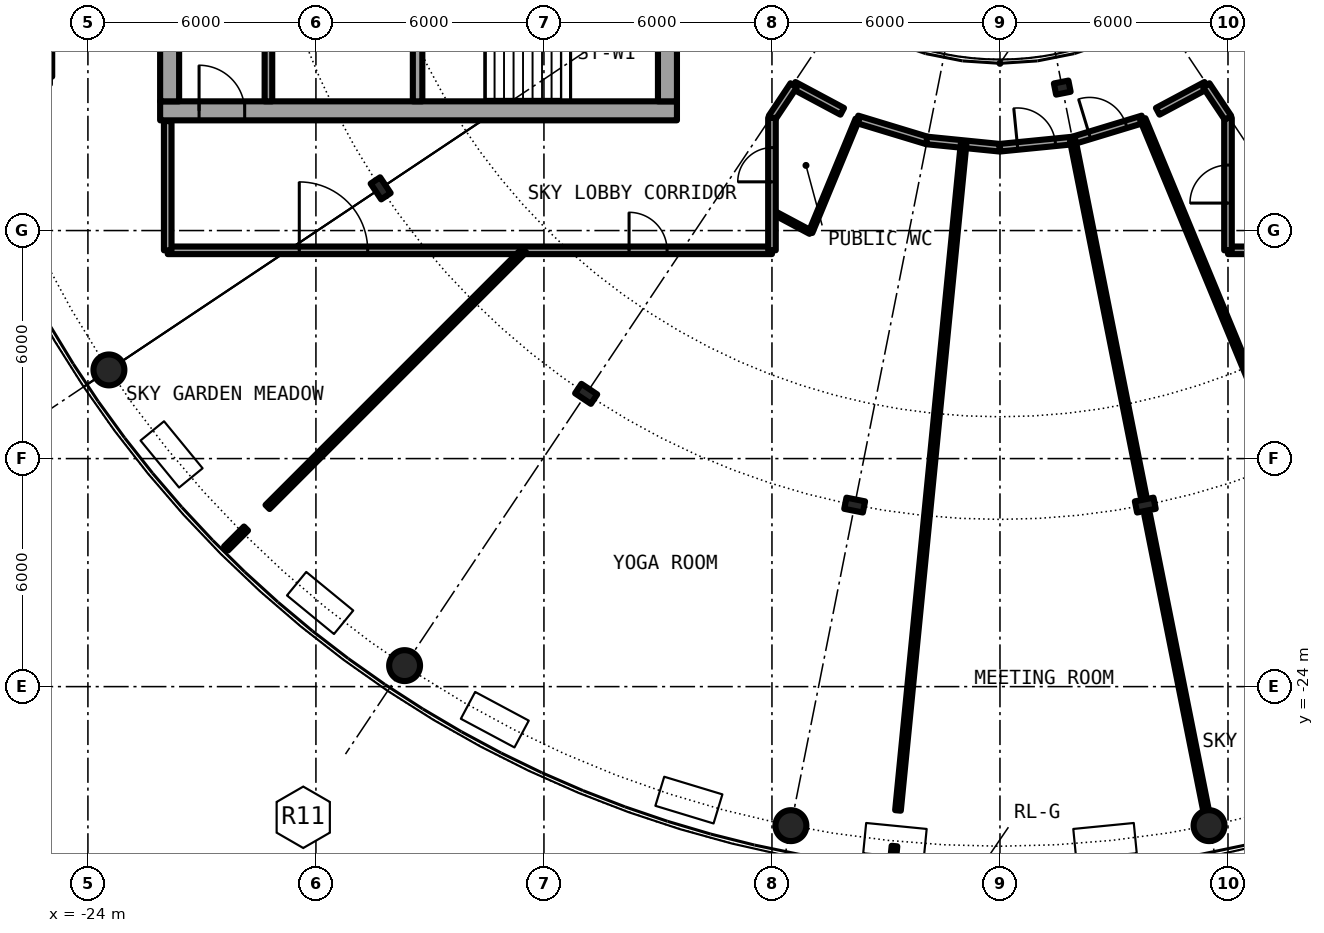
"""IFC4 building model, lengths in metres.
Left out: names, types, materials, properties, quantities, classifications, styles, units other than length and angle.
Written with IfcOpenShell. Run it as: python <this file> out.ifc"""

import sys

from ifc_helpers import new_model, si_unit, direction, frame, frame_2d, origin, origin_2d, place, context, subcontext, project, spatial, rectangle, hollow_circle, i_section, extrude, element, fill, save


model = new_model("IFC4")
c1 = context("Model", 3, precision=1e-05, world=origin(), true_north=direction((0.0, 1.0)))
c2 = subcontext(c1, "Body", "Model", "MODEL_VIEW")
j1 = project(units=[si_unit("LENGTHUNIT", "METRE"), si_unit("PLANEANGLEUNIT", "RADIAN")], contexts=[c1])
p1 = place(None, origin())
s1 = spatial("IfcSite", under=j1, at=p1, CompositionType="ELEMENT")
p2 = place(p1, origin())
s2 = spatial("IfcBuilding", under=s1, at=p2, CompositionType="ELEMENT")
p3 = place(p2, frame((0.0, 0.0, 179.9)))
s3 = spatial("IfcBuildingStorey", under=s2, at=p3, CompositionType="ELEMENT", Elevation=179.9)
for number, where, z_axis, x_axis in (
    (1, (-23.448, -15.667, 0.0), (0.0, 0.0, 1.0), (1.0, 0.0, 0.0)),
    (2, (-15.667, -23.448, 0.0), (0.0, 0.0, 1.0), (1.0, 0.0, 0.0)),
    (3, (-5.501, -27.658, 0.0), (0.0, 0.0, 1.0), (1.0, 0.0, 0.0)),
    (4, (5.501, -27.658, 0.0), (0.0, 0.0, 1.0), (1.0, 0.0, 0.0)),
):
    element("IfcColumn", number, at=place(p3, frame(where, z_axis=z_axis, x_axis=x_axis)), inside=s3, PredefinedType="COLUMN", context=c2, shape_type="SweptSolid", body=[
        extrude(hollow_circle(Radius=0.406, WallThickness=0.04, at=origin_2d()), origin(), (0.0, 0.0, 1.0), 6.1),
    ])
for number, where, z_axis, x_axis in (
    (5, (-16.297, -10.889, 0.0), (0.0, 0.0, 1.0), (-0.831, -0.556, 0.0)),
    (6, (-10.889, -16.297, 0.0), (0.0, 0.0, 1.0), (-0.556, -0.831, 0.0)),
    (7, (-3.824, -19.223, 0.0), (0.0, 0.0, 1.0), (-0.195, -0.981, 0.0)),
    (8, (3.824, -19.223, 0.0), (0.0, 0.0, 1.0), (0.195, -0.981, 0.0)),
):
    element("IfcColumn", number, at=place(p3, frame(where, z_axis=z_axis, x_axis=x_axis)), inside=s3, PredefinedType="COLUMN", context=c2, shape_type="SweptSolid", body=[
        extrude(i_section(OverallWidth=0.3, OverallDepth=0.5, WebThickness=0.014, FlangeThickness=0.028, FilletRadius=0.027, at=origin_2d()), origin(), (0.0, 0.0, 1.0), 6.1),
    ])
p4 = place(p3, frame((1.639, -8.239, 0.0), z_axis=(0.0, 0.0, 1.0), x_axis=(0.195090322016, -0.980785280403, 0.0)))
e9 = element("IfcColumn", 9, at=p4, inside=s3, PredefinedType="COLUMN", context=c2, shape_type="SweptSolid", body=[
    extrude(i_section(OverallWidth=0.3, OverallDepth=0.39, WebThickness=0.011, FlangeThickness=0.019, FilletRadius=0.027, at=origin_2d()), origin(), (0.0, 0.0, 1.0), 6.1),
])
p5 = place(p3, frame((-22.1, -8.85, 0.0), z_axis=(0.0, 0.0, 1.0), x_axis=(1.0, 0.0, 0.0)))
e10 = element("IfcWall", 10, at=p5, inside=s3, PredefinedType="SHEAR", context=c2, shape_type="SweptSolid", body=[
    extrude(rectangle(XDim=13.6, YDim=0.5, at=frame_2d((6.8, 0.0))), origin(), (0.0, 0.0, 1.0), 6.1),
])
p6 = place(p5, frame((1.025, 0.0, 0.0)))
e11 = element("IfcOpeningElement", 11, at=p6, cuts=e10, PredefinedType="OPENING", context=c2, shape_type="SweptSolid", body=[
    extrude(rectangle(XDim=1.2, YDim=2.3, at=frame_2d((0.6, 1.15))), frame((0.0, 0.26, 0.0), z_axis=(0.0, -1.0, 0.0), x_axis=(1.0, 0.0, 0.0)), (0.0, 0.0, 1.0), 0.52),
])
p7 = place(p3, frame((-21.85, -8.6, 0.0), z_axis=(0.0, 0.0, 1.0), x_axis=(0.0, 1.0, 0.0)))
e12 = element("IfcWall", 12, at=p7, inside=s3, PredefinedType="SHEAR", context=c2, shape_type="SweptSolid", body=[
    extrude(rectangle(XDim=17.2, YDim=0.5, at=frame_2d((8.6, 0.0))), origin(), (0.0, 0.0, 1.0), 6.1),
])
p8 = place(p7, frame((7.4, 0.0, 0.0)))
e13 = element("IfcOpeningElement", 13, at=p8, cuts=e12, PredefinedType="OPENING", context=c2, shape_type="SweptSolid", body=[
    extrude(rectangle(XDim=2.4, YDim=2.3, at=frame_2d((1.2, 1.15))), frame((0.0, 0.26, 0.0), z_axis=(0.0, -1.0, 0.0), x_axis=(1.0, 0.0, 0.0)), (0.0, 0.0, 1.0), 0.52),
])
p9 = place(p3, frame((-8.75, 8.6, 0.0), z_axis=(0.0, 0.0, 1.0), x_axis=(0.0, -1.0, 0.0)))
e14 = element("IfcWall", 14, at=p9, inside=s3, PredefinedType="SHEAR", context=c2, shape_type="SweptSolid", body=[
    extrude(rectangle(XDim=17.2, YDim=0.5, at=frame_2d((8.6, 0.0))), origin(), (0.0, 0.0, 1.0), 6.1),
])
p10 = place(p9, frame((7.4, 0.0, 0.1)))
e15 = element("IfcOpeningElement", 15, at=p10, cuts=e14, PredefinedType="OPENING", context=c2, shape_type="SweptSolid", body=[
    extrude(rectangle(XDim=2.4, YDim=2.2, at=frame_2d((1.2, 1.1))), frame((0.0, 0.26, 0.0), z_axis=(0.0, -1.0, 0.0), x_axis=(1.0, 0.0, 0.0)), (0.0, 0.0, 1.0), 0.52),
])
p11 = place(p3, frame((-15.325, -4.65, 0.0), z_axis=(0.0, 0.0, 1.0), x_axis=(0.0, -1.0, 0.0)))
e16 = element("IfcWall", 16, at=p11, inside=s3, PredefinedType="SHEAR", context=c2, shape_type="SweptSolid", body=[
    extrude(rectangle(XDim=3.95, YDim=0.25, at=frame_2d((1.975, 0.0))), origin(), (0.0, 0.0, 1.0), 6.1),
])
p12 = place(p11, frame((1.375, 0.0, 0.0)))
e17 = element("IfcOpeningElement", 17, at=p12, cuts=e16, PredefinedType="OPENING", context=c2, shape_type="SweptSolid", body=[
    extrude(rectangle(XDim=1.2, YDim=2.3, at=frame_2d((0.6, 1.15))), frame((0.0, 0.135, 0.0), z_axis=(0.0, -1.0, 0.0), x_axis=(1.0, 0.0, 0.0)), (0.0, 0.0, 1.0), 0.27),
])
p13 = place(p3, frame((-19.25, -1.575, 0.0), z_axis=(0.0, 0.0, 1.0), x_axis=(0.0, -1.0, 0.0)))
e18 = element("IfcWall", 18, at=p13, inside=s3, PredefinedType="SOLIDWALL", context=c2, shape_type="SweptSolid", body=[
    extrude(rectangle(XDim=7.025, YDim=0.2, at=frame_2d((3.513, 0.0))), origin(), (0.0, 0.0, 1.0), 5.7),
])
p14 = place(p13, frame((4.475, 0.0, 0.0)))
e19 = element("IfcOpeningElement", 19, at=p14, cuts=e18, PredefinedType="OPENING", context=c2, shape_type="SweptSolid", body=[
    extrude(rectangle(XDim=1.1, YDim=2.3, at=frame_2d((0.55, 1.15))), frame((0.0, 0.11, 0.0), z_axis=(0.0, -1.0, 0.0), x_axis=(1.0, 0.0, 0.0)), (0.0, 0.0, 1.0), 0.22),
])
p15 = place(p3, frame((-25.0, -3.5, 0.0), z_axis=(0.0, 0.0, 1.0), x_axis=(0.0, -1.0, 0.0)))
e20 = element("IfcWall", 20, at=p15, inside=s3, PredefinedType="PARTITIONING", context=c2, shape_type="SweptSolid", body=[
    extrude(rectangle(XDim=4.45, YDim=0.12, at=frame_2d((2.225, 0.0))), origin(), (0.0, 0.0, 1.0), 5.7),
])
p16 = place(p15, frame((0.4, 0.0, 0.1)))
e21 = element("IfcOpeningElement", 21, at=p16, cuts=e20, PredefinedType="OPENING", context=c2, shape_type="SweptSolid", body=[
    extrude(rectangle(XDim=3.6, YDim=5.35, at=frame_2d((1.8, 2.675))), frame((0.0, 0.07, 0.0), z_axis=(0.0, -1.0, 0.0), x_axis=(1.0, 0.0, 0.0)), (0.0, 0.0, 1.0), 0.14),
])
p17 = place(p3, frame((-6.0, -11.503, 0.0), z_axis=(0.0, 0.0, 1.0), x_axis=(0.882235076446, -0.470809165042, 0.0)))
e22 = element("IfcWall", 22, at=p17, inside=s3, PredefinedType="PARTITIONING", context=c2, shape_type="SweptSolid", body=[
    extrude(rectangle(XDim=1.147, YDim=0.1, at=frame_2d((0.573, 0.0))), origin(), (0.0, 0.0, 1.0), 5.7),
])
p18 = place(p3, frame((-21.9, -12.52, 0.0), z_axis=(0.0, 0.0, 1.0), x_axis=(1.0, 0.0, 0.0)))
e23 = element("IfcWall", 23, at=p18, inside=s3, PredefinedType="PARTITIONING", context=c2, shape_type="SweptSolid", body=[
    extrude(rectangle(XDim=15.9, YDim=0.2, at=frame_2d((7.95, 0.0))), origin(), (0.0, 0.0, 1.0), 5.7),
])
p19 = place(p18, frame((12.14, 0.0, 0.0)))
e24 = element("IfcOpeningElement", 24, at=p19, cuts=e23, PredefinedType="OPENING", context=c2, shape_type="SweptSolid", body=[
    extrude(rectangle(XDim=1.0, YDim=2.3, at=frame_2d((0.5, 1.15))), frame((0.0, 0.11, 0.0), z_axis=(0.0, -1.0, 0.0), x_axis=(1.0, 0.0, 0.0)), (0.0, 0.0, 1.0), 0.22),
])
p20 = place(p18, frame((3.462, 0.0, 0.0)))
e25 = element("IfcOpeningElement", 25, at=p20, cuts=e23, PredefinedType="OPENING", context=c2, shape_type="SweptSolid", body=[
    extrude(rectangle(XDim=1.8, YDim=2.3, at=frame_2d((0.9, 1.15))), frame((0.0, 0.11, 0.0), z_axis=(0.0, -1.0, 0.0), x_axis=(1.0, 0.0, 0.0)), (0.0, 0.0, 1.0), 0.22),
])
p21 = place(p3, frame((6.0, -12.52, 0.0), z_axis=(0.0, 0.0, 1.0), x_axis=(1.0, 0.0, 0.0)))
e26 = element("IfcWall", 26, at=p21, inside=s3, PredefinedType="PARTITIONING", context=c2, shape_type="SweptSolid", body=[
    extrude(rectangle(XDim=15.9, YDim=0.2, at=frame_2d((7.95, 0.0))), origin(), (0.0, 0.0, 1.0), 5.7),
])
p22 = place(p21, frame((3.943, 0.0, 0.0)))
e27 = element("IfcOpeningElement", 27, at=p22, cuts=e26, PredefinedType="OPENING", context=c2, shape_type="SweptSolid", body=[
    extrude(rectangle(XDim=1.0, YDim=2.3, at=frame_2d((0.5, 1.15))), frame((0.0, 0.11, 0.0), z_axis=(0.0, -1.0, 0.0), x_axis=(1.0, 0.0, 0.0)), (0.0, 0.0, 1.0), 0.22),
])
p23 = place(p21, frame((10.72, 0.0, 0.0)))
e28 = element("IfcOpeningElement", 28, at=p23, cuts=e26, PredefinedType="OPENING", context=c2, shape_type="SweptSolid", body=[
    extrude(rectangle(XDim=1.8, YDim=2.3, at=frame_2d((0.9, 1.15))), frame((0.0, 0.11, 0.0), z_axis=(0.0, -1.0, 0.0), x_axis=(1.0, 0.0, 0.0)), (0.0, 0.0, 1.0), 0.22),
])
p24 = place(p3, frame((-5.429, -8.179, 0.0), z_axis=(0.0, 0.0, 1.0), x_axis=(0.881652665802, -0.471898905364, 0.0)))
e29 = element("IfcWall", 29, at=p24, inside=s3, PredefinedType="PARTITIONING", context=c2, shape_type="SweptSolid", body=[
    extrude(rectangle(XDim=1.45, YDim=0.2, at=frame_2d((0.725, 0.0))), origin(), (0.0, 0.0, 1.0), 5.7),
])
p25 = place(p3, frame((-3.758, -9.072, 0.0), z_axis=(0.0, 0.0, 1.0), x_axis=(0.956896312675, -0.29042976223, 0.0)))
e30 = element("IfcWall", 30, at=p25, inside=s3, PredefinedType="PARTITIONING", context=c2, shape_type="SweptSolid", body=[
    extrude(rectangle(XDim=1.925, YDim=0.2, at=frame_2d((0.962, 0.0))), origin(), (0.0, 0.0, 1.0), 5.7),
])
p26 = place(p3, frame((-1.929, -9.629, 0.0), z_axis=(0.0, 0.0, 1.0), x_axis=(0.995059761059, -0.09927775139, 0.0)))
e31 = element("IfcWall", 31, at=p26, inside=s3, PredefinedType="PARTITIONING", context=c2, shape_type="SweptSolid", body=[
    extrude(rectangle(XDim=1.926, YDim=0.2, at=frame_2d((0.963, 0.0))), origin(), (0.0, 0.0, 1.0), 5.7),
])
p27 = place(p3, frame((0.0, -9.82, 0.0), z_axis=(0.0, 0.0, 1.0), x_axis=(0.995171860647, 0.098147683504, 0.0)))
e32 = element("IfcWall", 32, at=p27, inside=s3, PredefinedType="PARTITIONING", context=c2, shape_type="SweptSolid", body=[
    extrude(rectangle(XDim=1.925, YDim=0.2, at=frame_2d((0.963, 0.0))), origin(), (0.0, 0.0, 1.0), 5.7),
])
p28 = place(p27, frame((0.463, 0.0, 0.0)))
e33 = element("IfcOpeningElement", 33, at=p28, cuts=e32, PredefinedType="OPENING", context=c2, shape_type="SweptSolid", body=[
    extrude(rectangle(XDim=1.0, YDim=2.3, at=frame_2d((0.5, 1.15))), frame((0.0, 0.11, 0.0), z_axis=(0.0, -1.0, 0.0), x_axis=(1.0, 0.0, 0.0)), (0.0, 0.0, 1.0), 0.22),
])
p29 = place(p3, frame((1.916, -9.631, 0.0), z_axis=(0.0, 0.0, 1.0), x_axis=(0.956896312675, 0.29042976223, 0.0)))
e34 = element("IfcWall", 34, at=p29, inside=s3, PredefinedType="PARTITIONING", context=c2, shape_type="SweptSolid", body=[
    extrude(rectangle(XDim=1.925, YDim=0.2, at=frame_2d((0.962, 0.0))), origin(), (0.0, 0.0, 1.0), 5.7),
])
p30 = place(p29, frame((0.462, 0.0, 0.0)))
e35 = element("IfcOpeningElement", 35, at=p30, cuts=e34, PredefinedType="OPENING", context=c2, shape_type="SweptSolid", body=[
    extrude(rectangle(XDim=1.0, YDim=2.3, at=frame_2d((0.5, 1.15))), frame((0.0, 0.11, 0.0), z_axis=(0.0, -1.0, 0.0), x_axis=(1.0, 0.0, 0.0)), (0.0, 0.0, 1.0), 0.22),
])
p31 = place(p3, frame((4.151, -8.862, 0.0), z_axis=(0.0, 0.0, 1.0), x_axis=(0.88193287619, 0.471375011954, 0.0)))
e36 = element("IfcWall", 36, at=p31, inside=s3, PredefinedType="PARTITIONING", context=c2, shape_type="SweptSolid", body=[
    extrude(rectangle(XDim=1.449, YDim=0.2, at=frame_2d((0.725, 0.0))), origin(), (0.0, 0.0, 1.0), 5.7),
])
p32 = place(p3, frame((6.0, -12.52, 0.0), z_axis=(0.0, 0.0, 1.0), x_axis=(0.0, 1.0, 0.0)))
e37 = element("IfcWall", 37, at=p32, inside=s3, PredefinedType="PARTITIONING", context=c2, shape_type="SweptSolid", body=[
    extrude(rectangle(XDim=3.486, YDim=0.2, at=frame_2d((1.743, 0.0))), origin(), (0.0, 0.0, 1.0), 5.7),
])
p33 = place(p32, frame((1.243, 0.0, 0.0)))
e38 = element("IfcOpeningElement", 38, at=p33, cuts=e37, PredefinedType="OPENING", context=c2, shape_type="SweptSolid", body=[
    extrude(rectangle(XDim=1.0, YDim=2.3, at=frame_2d((0.5, 1.15))), frame((0.0, 0.11, 0.0), z_axis=(0.0, -1.0, 0.0), x_axis=(1.0, 0.0, 0.0)), (0.0, 0.0, 1.0), 0.22),
])
for number, where, z_axis, x_axis in (
    (39, (-6.0, -9.034, 0.0), (0.0, 0.0, 1.0), (0.555, 0.832, 0.0)),
    (40, (5.429, -8.179, 0.0), (0.0, 0.0, 1.0), (0.555, -0.832, 0.0)),
):
    element("IfcWall", number, at=place(p3, frame(where, z_axis=z_axis, x_axis=x_axis)), inside=s3, PredefinedType="PARTITIONING", context=c2, shape_type="SweptSolid", body=[
        extrude(rectangle(XDim=1.028, YDim=0.2, at=frame_2d((0.514, 0.0))), origin(), (0.0, 0.0, 1.0), 5.7),
    ])
p34 = place(p3, frame((-20.365, -20.365, 0.0), z_axis=(0.0, 0.0, 1.0), x_axis=(0.707106781187, 0.707106781187, 0.0)))
e41 = element("IfcWall", 41, at=p34, inside=s3, PredefinedType="PARTITIONING", context=c2, shape_type="SweptSolid", body=[
    extrude(rectangle(XDim=0.742, YDim=0.15, at=frame_2d((0.371, 0.0))), origin(), (0.0, 0.0, 1.0), 5.7),
])
p35 = place(p3, frame((-19.274, -19.274, 0.0), z_axis=(0.0, 0.0, 1.0), x_axis=(0.707106781187, 0.707106781187, 0.0)))
e42 = element("IfcWall", 42, at=p35, inside=s3, PredefinedType="PARTITIONING", context=c2, shape_type="SweptSolid", body=[
    extrude(rectangle(XDim=9.552, YDim=0.15, at=frame_2d((4.776, 0.0))), origin(), (0.0, 0.0, 1.0), 5.7),
])
p36 = place(p3, frame((-4.984, -12.045, 0.0), z_axis=(0.0, 0.0, 1.0), x_axis=(0.382517205945, 0.923948368231, 0.0)))
e43 = element("IfcWall", 43, at=p36, inside=s3, PredefinedType="PARTITIONING", context=c2, shape_type="SweptSolid", body=[
    extrude(rectangle(XDim=3.216, YDim=0.1, at=frame_2d((1.608, 0.0))), origin(), (0.0, 0.0, 1.0), 5.7),
])
p37 = place(p3, frame((-2.809, -28.523, 0.0), z_axis=(0.0, 0.0, 1.0), x_axis=(0.100750553687, 0.994911717657, 0.0)))
e44 = element("IfcWall", 44, at=p37, inside=s3, PredefinedType="PARTITIONING", context=c2, shape_type="SweptSolid", body=[
    extrude(rectangle(XDim=0.33, YDim=0.15, at=frame_2d((0.165, 0.0))), origin(), (0.0, 0.0, 1.0), 5.7),
])
p38 = place(p3, frame((-2.684, -27.258, 0.0), z_axis=(0.0, 0.0, 1.0), x_axis=(0.097979173801, 0.995188465318, 0.0)))
e45 = element("IfcWall", 45, at=p38, inside=s3, PredefinedType="PARTITIONING", context=c2, shape_type="SweptSolid", body=[
    extrude(rectangle(XDim=17.617, YDim=0.15, at=frame_2d((8.808, 0.0))), origin(), (0.0, 0.0, 1.0), 5.7),
])
p39 = place(p3, frame((1.916, -9.631, 0.0), z_axis=(0.0, 0.0, 1.0), x_axis=(0.195056807593, -0.980791946241, 0.0)))
e46 = element("IfcWall", 46, at=p39, inside=s3, PredefinedType="PARTITIONING", context=c2, shape_type="SweptSolid", body=[
    extrude(rectangle(XDim=9.53, YDim=0.15, at=frame_2d((4.765, 0.0))), origin(), (0.0, 0.0, 1.0), 5.7),
])
p40 = place(p3, frame((3.758, -9.072, 0.0), z_axis=(0.0, 0.0, 1.0), x_axis=(0.38265514428, -0.923891249312, 0.0)))
e47 = element("IfcWall", 47, at=p40, inside=s3, PredefinedType="PARTITIONING", context=c2, shape_type="SweptSolid", body=[
    extrude(rectangle(XDim=17.438, YDim=0.15, at=frame_2d((8.719, 0.0))), origin(), (0.0, 0.0, 1.0), 5.7),
])
p41 = place(p3, frame((3.872, -19.469, 0.0), z_axis=(0.0, 0.0, 1.0), x_axis=(0.195194883509, -0.980764476035, 0.0)))
e48 = element("IfcWall", 48, at=p41, inside=s3, PredefinedType="PARTITIONING", context=c2, shape_type="SweptSolid", body=[
    extrude(rectangle(XDim=7.951, YDim=0.15, at=frame_2d((3.976, 0.0))), origin(), (0.0, 0.0, 1.0), 5.7),
])
p42 = place(p3, frame((-6.0, -12.52, 0.0), z_axis=(0.0, 0.0, 1.0), x_axis=(0.0, 1.0, 0.0)))
e49 = element("IfcWall", 49, at=p42, inside=s3, PredefinedType="PARTITIONING", context=c2, shape_type="SweptSolid", body=[
    extrude(rectangle(XDim=3.486, YDim=0.2, at=frame_2d((1.743, 0.0))), origin(), (0.0, 0.0, 1.0), 5.7),
])
p43 = place(p42, frame((1.802, 0.0, 0.0)))
e50 = element("IfcOpeningElement", 50, at=p43, cuts=e49, PredefinedType="OPENING", context=c2, shape_type="SweptSolid", body=[
    extrude(rectangle(XDim=0.9, YDim=2.3, at=frame_2d((0.45, 1.15))), frame((0.0, 0.11, 0.0), z_axis=(0.0, -1.0, 0.0), x_axis=(1.0, 0.0, 0.0)), (0.0, 0.0, 1.0), 0.22),
])
p44 = place(p3, frame((-21.9, -12.52, 0.0), z_axis=(0.0, 0.0, 1.0), x_axis=(0.0, 1.0, 0.0)))
e51 = element("IfcWall", 51, at=p44, inside=s3, PredefinedType="PARTITIONING", context=c2, shape_type="SweptSolid", body=[
    extrude(rectangle(XDim=3.4, YDim=0.2, at=frame_2d((1.7, 0.0))), origin(), (0.0, 0.0, 1.0), 5.7),
])
p45 = place(p6, origin())
e52 = element("IfcDoor", 52, at=p45, inside=s3, OperationType="SINGLE_SWING_RIGHT", PredefinedType="DOOR", context=c2, shape_type="SweptSolid", body=[
    extrude(rectangle(XDim=1.2, YDim=2.3, at=frame_2d((0.6, 1.15))), frame((0.0, 0.025, 0.0), z_axis=(0.0, -1.0, 0.0), x_axis=(1.0, 0.0, 0.0)), (0.0, 0.0, 1.0), 0.05),
])
fill(e11, e52)
p46 = place(p43, origin())
e53 = element("IfcDoor", 53, at=p46, inside=s3, OperationType="SINGLE_SWING_RIGHT", PredefinedType="DOOR", context=c2, shape_type="SweptSolid", body=[
    extrude(rectangle(XDim=0.9, YDim=2.3, at=frame_2d((0.45, 1.15))), frame((0.0, 0.025, 0.0), z_axis=(0.0, -1.0, 0.0), x_axis=(1.0, 0.0, 0.0)), (0.0, 0.0, 1.0), 0.05),
])
fill(e50, e53)
p47 = place(p19, origin())
e54 = element("IfcDoor", 54, at=p47, inside=s3, OperationType="SINGLE_SWING_RIGHT", PredefinedType="DOOR", context=c2, shape_type="SweptSolid", body=[
    extrude(rectangle(XDim=1.0, YDim=2.3, at=frame_2d((0.5, 1.15))), frame((0.0, 0.025, 0.0), z_axis=(0.0, -1.0, 0.0), x_axis=(1.0, 0.0, 0.0)), (0.0, 0.0, 1.0), 0.05),
])
fill(e24, e54)
p48 = place(p28, origin())
e55 = element("IfcDoor", 55, at=p48, inside=s3, OperationType="SINGLE_SWING_LEFT", PredefinedType="DOOR", context=c2, shape_type="SweptSolid", body=[
    extrude(rectangle(XDim=1.0, YDim=2.3, at=frame_2d((0.5, 1.15))), frame((0.0, 0.025, 0.0), z_axis=(0.0, -1.0, 0.0), x_axis=(1.0, 0.0, 0.0)), (0.0, 0.0, 1.0), 0.05),
])
fill(e33, e55)
p49 = place(p33, origin())
e56 = element("IfcDoor", 56, at=p49, inside=s3, OperationType="SINGLE_SWING_LEFT", PredefinedType="DOOR", context=c2, shape_type="SweptSolid", body=[
    extrude(rectangle(XDim=1.0, YDim=2.3, at=frame_2d((0.5, 1.15))), frame((0.0, 0.025, 0.0), z_axis=(0.0, -1.0, 0.0), x_axis=(1.0, 0.0, 0.0)), (0.0, 0.0, 1.0), 0.05),
])
fill(e38, e56)
p50 = place(p20, origin())
e57 = element("IfcDoor", 57, at=p50, inside=s3, OperationType="DOUBLE_DOOR_SINGLE_SWING", PredefinedType="DOOR", context=c2, shape_type="SweptSolid", body=[
    extrude(rectangle(XDim=1.8, YDim=2.3, at=frame_2d((0.9, 1.15))), frame((0.0, 0.025, 0.0), z_axis=(0.0, -1.0, 0.0), x_axis=(1.0, 0.0, 0.0)), (0.0, 0.0, 1.0), 0.05),
])
fill(e25, e57)
p51 = place(p30, origin())
e58 = element("IfcDoor", 58, at=p51, inside=s3, OperationType="SINGLE_SWING_LEFT", PredefinedType="DOOR", context=c2, shape_type="SweptSolid", body=[
    extrude(rectangle(XDim=1.0, YDim=2.3, at=frame_2d((0.5, 1.15))), frame((0.0, 0.025, 0.0), z_axis=(0.0, -1.0, 0.0), x_axis=(1.0, 0.0, 0.0)), (0.0, 0.0, 1.0), 0.05),
])
fill(e35, e58)
save(model, sys.argv[1])
